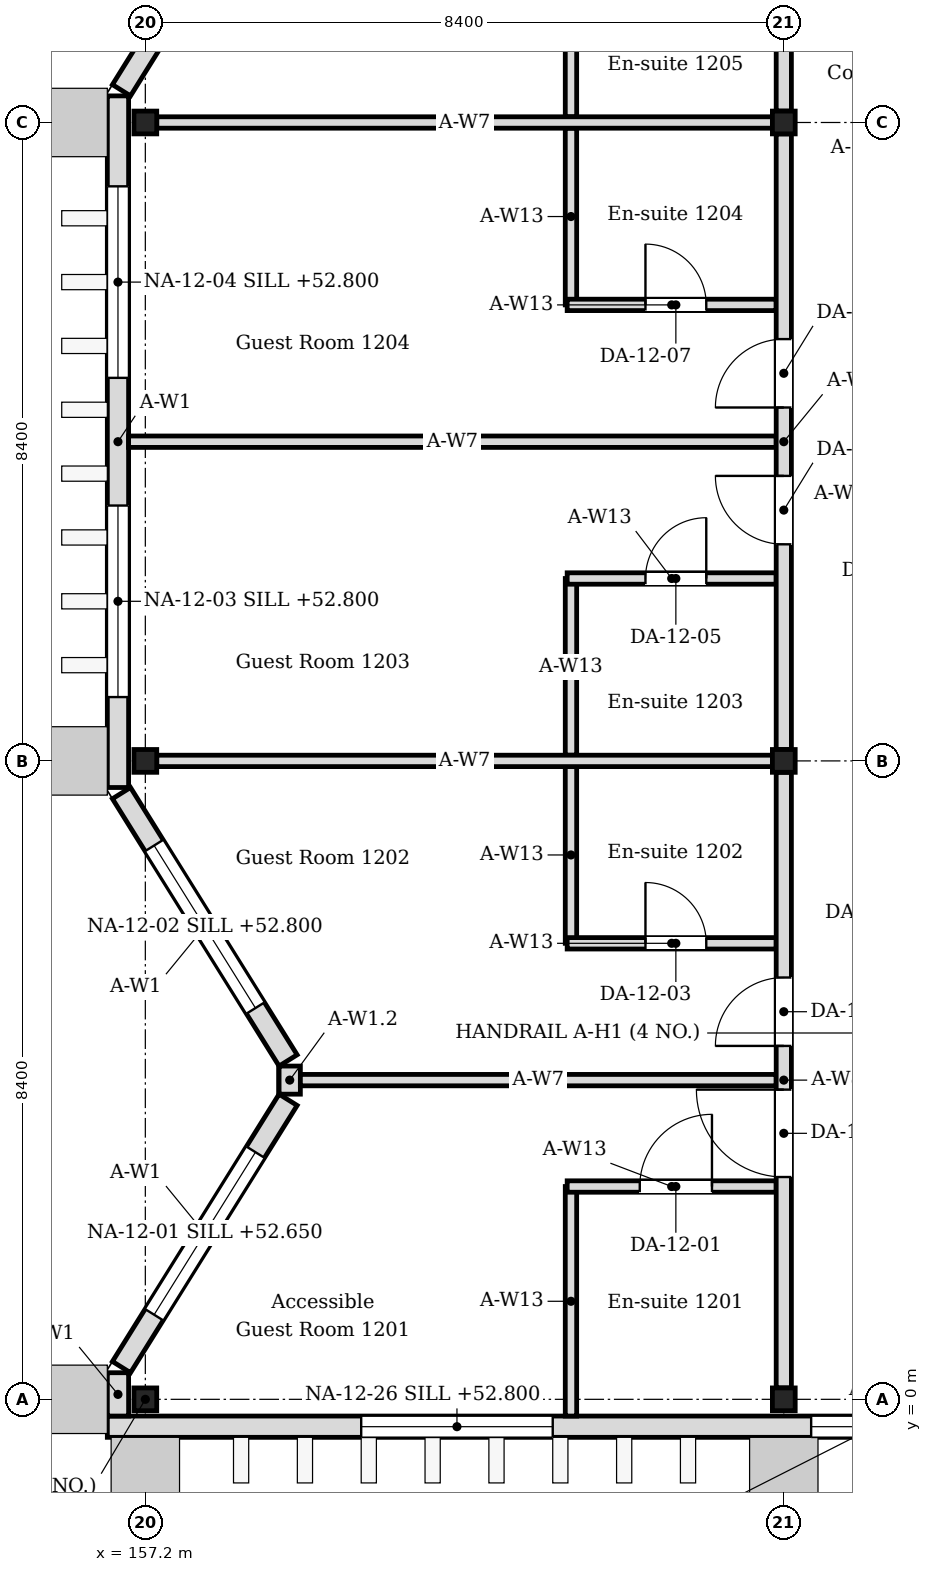
"""IFC4 building model, lengths in metres.
Left out: names, types, materials, properties, quantities, classifications, styles, units other than length and angle.
Written with IfcOpenShell. Run it as: python <this file> out.ifc"""

import sys

from ifc_helpers import new_model, si_unit, direction, frame, frame_2d, origin, origin_2d, place, context, subcontext, project, spatial, rectangle, i_section, extrude, element, fill, save


model = new_model("IFC4")
c1 = context("Model", 3, precision=1e-05, world=origin(), true_north=direction((0.0, 1.0)))
c2 = subcontext(c1, "Body", "Model", "MODEL_VIEW")
j1 = project(units=[si_unit("LENGTHUNIT", "METRE"), si_unit("PLANEANGLEUNIT", "RADIAN")], contexts=[c1])
p1 = place(None, origin())
s1 = spatial("IfcSite", under=j1, at=p1, CompositionType="ELEMENT")
p2 = place(p1, origin())
s2 = spatial("IfcBuilding", under=s1, at=p2, CompositionType="ELEMENT")
p3 = place(p2, frame((0.0, 0.0, 52.2)))
s3 = spatial("IfcBuildingStorey", under=s2, at=p3, CompositionType="ELEMENT", Elevation=52.2)
for number, where, z_axis, x_axis in (
    (1, (157.2, 0.0, 0.0), (0.0, 0.0, 1.0), (1.0, 0.0, 0.0)),
    (2, (157.2, 8.4, 0.0), (0.0, 0.0, 1.0), (1.0, 0.0, 0.0)),
    (3, (157.2, 16.8, 0.0), (0.0, 0.0, 1.0), (1.0, 0.0, 0.0)),
    (4, (165.6, 0.0, 0.0), (0.0, 0.0, 1.0), (1.0, 0.0, 0.0)),
    (5, (165.6, 8.4, 0.0), (0.0, 0.0, 1.0), (1.0, 0.0, 0.0)),
    (6, (165.6, 16.8, 0.0), (0.0, 0.0, 1.0), (1.0, 0.0, 0.0)),
):
    element("IfcColumn", number, at=place(p3, frame(where, z_axis=z_axis, x_axis=x_axis)), inside=s3, PredefinedType="COLUMN", context=c2, shape_type="SweptSolid", body=[
        extrude(i_section(OverallWidth=0.3, OverallDepth=0.3, WebThickness=0.01, FlangeThickness=0.015, FilletRadius=0.013, at=origin_2d()), origin(), (0.0, 0.0, 1.0), 4.2),
    ])
p4 = place(p3, frame((156.84, -0.22, 0.0), z_axis=(0.0, 0.0, 1.0), x_axis=(0.0, 1.0, 0.0)))
e7 = element("IfcWall", 7, at=p4, inside=s3, PredefinedType="SOLIDWALL", context=c2, shape_type="SweptSolid", body=[
    extrude(rectangle(XDim=0.57, YDim=0.28, at=frame_2d((0.285, 0.0))), origin(), (0.0, 0.0, 1.0), 4.05),
])
p5 = place(p3, frame((156.886, 0.424, 0.0), z_axis=(0.0, 0.0, 1.0), x_axis=(0.529018946142, 0.848610013271, 0.0)))
e8 = element("IfcWall", 8, at=p5, inside=s3, PredefinedType="SOLIDWALL", context=c2, shape_type="SweptSolid", body=[
    extrude(rectangle(XDim=4.144, YDim=0.28, at=frame_2d((2.072, 0.0))), origin(), (0.0, 0.0, 1.0), 4.05),
])
p6 = place(p5, frame((0.812, 0.0, 0.45)))
e9 = element("IfcOpeningElement", 9, at=p6, cuts=e8, PredefinedType="OPENING", context=c2, shape_type="SweptSolid", body=[
    extrude(rectangle(XDim=2.52, YDim=2.1, at=frame_2d((1.26, 1.05))), frame((0.0, 0.15, 0.0), z_axis=(0.0, -1.0, 0.0), x_axis=(1.0, 0.0, 0.0)), (0.0, 0.0, 1.0), 0.3),
])
p7 = place(p3, frame((159.079, 4.459, 0.0), z_axis=(0.0, 0.0, 1.0), x_axis=(-0.529018946142, 0.848610013271, 0.0)))
e10 = element("IfcWall", 10, at=p7, inside=s3, PredefinedType="SOLIDWALL", context=c2, shape_type="SweptSolid", body=[
    extrude(rectangle(XDim=4.144, YDim=0.28, at=frame_2d((2.072, 0.0))), origin(), (0.0, 0.0, 1.0), 4.05),
])
p8 = place(p7, frame((0.812, 0.0, 0.6)))
e11 = element("IfcOpeningElement", 11, at=p8, cuts=e10, PredefinedType="OPENING", context=c2, shape_type="SweptSolid", body=[
    extrude(rectangle(XDim=2.52, YDim=2.4, at=frame_2d((1.26, 1.2))), frame((0.0, 0.15, 0.0), z_axis=(0.0, -1.0, 0.0), x_axis=(1.0, 0.0, 0.0)), (0.0, 0.0, 1.0), 0.3),
])
p9 = place(p3, frame((159.1, 4.015, 0.0), z_axis=(0.0, 0.0, 1.0), x_axis=(0.0, 1.0, 0.0)))
e12 = element("IfcWall", 12, at=p9, inside=s3, PredefinedType="SOLIDWALL", context=c2, shape_type="SweptSolid", body=[
    extrude(rectangle(XDim=0.37, YDim=0.28, at=frame_2d((0.185, 0.0))), origin(), (0.0, 0.0, 1.0), 3.604),
])
p10 = place(p3, frame((156.84, 8.05, 0.0), z_axis=(0.0, 0.0, 1.0), x_axis=(0.0, 1.0, 0.0)))
e13 = element("IfcWall", 13, at=p10, inside=s3, PredefinedType="SOLIDWALL", context=c2, shape_type="SweptSolid", body=[
    extrude(rectangle(XDim=9.1, YDim=0.28, at=frame_2d((4.55, 0.0))), origin(), (0.0, 0.0, 1.0), 4.05),
])
p11 = place(p10, frame((1.19, 0.0, 0.6)))
e14 = element("IfcOpeningElement", 14, at=p11, cuts=e13, PredefinedType="OPENING", context=c2, shape_type="SweptSolid", body=[
    extrude(rectangle(XDim=2.52, YDim=2.4, at=frame_2d((1.26, 1.2))), frame((0.0, 0.15, 0.0), z_axis=(0.0, -1.0, 0.0), x_axis=(1.0, 0.0, 0.0)), (0.0, 0.0, 1.0), 0.3),
])
p12 = place(p10, frame((5.39, 0.0, 0.6)))
e15 = element("IfcOpeningElement", 15, at=p12, cuts=e13, PredefinedType="OPENING", context=c2, shape_type="SweptSolid", body=[
    extrude(rectangle(XDim=2.52, YDim=2.4, at=frame_2d((1.26, 1.2))), frame((0.0, 0.15, 0.0), z_axis=(0.0, -1.0, 0.0), x_axis=(1.0, 0.0, 0.0)), (0.0, 0.0, 1.0), 0.3),
])
p13 = place(p3, frame((156.886, 17.224, 0.0), z_axis=(0.0, 0.0, 1.0), x_axis=(0.529018946142, 0.848610013271, 0.0)))
e16 = element("IfcWall", 16, at=p13, inside=s3, PredefinedType="SOLIDWALL", context=c2, shape_type="SweptSolid", body=[
    extrude(rectangle(XDim=4.144, YDim=0.28, at=frame_2d((2.072, 0.0))), origin(), (0.0, 0.0, 1.0), 4.05),
])
p14 = place(p13, frame((0.812, 0.0, 0.6)))
e17 = element("IfcOpeningElement", 17, at=p14, cuts=e16, PredefinedType="OPENING", context=c2, shape_type="SweptSolid", body=[
    extrude(rectangle(XDim=2.52, YDim=2.4, at=frame_2d((1.26, 1.2))), frame((0.0, 0.15, 0.0), z_axis=(0.0, -1.0, 0.0), x_axis=(1.0, 0.0, 0.0)), (0.0, 0.0, 1.0), 0.3),
])
p15 = place(p3, frame((156.7, -0.36, 0.0), z_axis=(0.0, 0.0, 1.0), x_axis=(1.0, 0.0, 0.0)))
e18 = element("IfcWall", 18, at=p15, inside=s3, PredefinedType="SOLIDWALL", context=c2, shape_type="SweptSolid", body=[
    extrude(rectangle(XDim=20.2, YDim=0.28, at=frame_2d((10.1, 0.0))), origin(), (0.0, 0.0, 1.0), 4.05),
])
p16 = place(p15, frame((9.26, 0.0, 0.6)))
e19 = element("IfcOpeningElement", 19, at=p16, cuts=e18, PredefinedType="OPENING", context=c2, shape_type="SweptSolid", body=[
    extrude(rectangle(XDim=1.68, YDim=2.4, at=frame_2d((0.84, 1.2))), frame((0.0, 0.15, 0.0), z_axis=(0.0, -1.0, 0.0), x_axis=(1.0, 0.0, 0.0)), (0.0, 0.0, 1.0), 0.3),
])
p17 = place(p15, frame((3.34, 0.0, 0.6)))
e20 = element("IfcOpeningElement", 20, at=p17, cuts=e18, PredefinedType="OPENING", context=c2, shape_type="SweptSolid", body=[
    extrude(rectangle(XDim=2.52, YDim=2.4, at=frame_2d((1.26, 1.2))), frame((0.0, 0.15, 0.0), z_axis=(0.0, -1.0, 0.0), x_axis=(1.0, 0.0, 0.0)), (0.0, 0.0, 1.0), 0.3),
])
p18 = place(p3, frame((162.8, -0.22, 0.0), z_axis=(0.0, 0.0, 1.0), x_axis=(0.0, 1.0, 0.0)))
e21 = element("IfcWall", 21, at=p18, inside=s3, PredefinedType="PARTITIONING", context=c2, shape_type="SweptSolid", body=[
    extrude(rectangle(XDim=3.02, YDim=0.15, at=frame_2d((1.51, 0.0))), origin(), (0.0, 0.0, 1.0), 4.05),
])
p19 = place(p3, frame((162.75, 2.8, 0.0), z_axis=(0.0, 0.0, 1.0), x_axis=(1.0, 0.0, 0.0)))
e22 = element("IfcWall", 22, at=p19, inside=s3, PredefinedType="PARTITIONING", context=c2, shape_type="SweptSolid", body=[
    extrude(rectangle(XDim=2.75, YDim=0.15, at=frame_2d((1.375, 0.0))), origin(), (0.0, 0.0, 1.0), 4.05),
])
p20 = place(p19, frame((0.955, 0.0, 0.0)))
e23 = element("IfcOpeningElement", 23, at=p20, cuts=e22, PredefinedType="OPENING", context=c2, shape_type="SweptSolid", body=[
    extrude(rectangle(XDim=0.95, YDim=2.1, at=frame_2d((0.475, 1.05))), frame((0.0, 0.085, 0.0), z_axis=(0.0, -1.0, 0.0), x_axis=(1.0, 0.0, 0.0)), (0.0, 0.0, 1.0), 0.17),
])
p21 = place(p3, frame((162.8, 6.0, 0.0), z_axis=(0.0, 0.0, 1.0), x_axis=(0.0, 1.0, 0.0)))
e24 = element("IfcWall", 24, at=p21, inside=s3, PredefinedType="PARTITIONING", context=c2, shape_type="SweptSolid", body=[
    extrude(rectangle(XDim=2.325, YDim=0.15, at=frame_2d((1.163, 0.0))), origin(), (0.0, 0.0, 1.0), 4.05),
])
p22 = place(p3, frame((162.75, 6.0, 0.0), z_axis=(0.0, 0.0, 1.0), x_axis=(1.0, 0.0, 0.0)))
e25 = element("IfcWall", 25, at=p22, inside=s3, PredefinedType="PARTITIONING", context=c2, shape_type="SweptSolid", body=[
    extrude(rectangle(XDim=2.75, YDim=0.15, at=frame_2d((1.375, 0.0))), origin(), (0.0, 0.0, 1.0), 4.05),
])
p23 = place(p22, frame((1.03, 0.0, 0.0)))
e26 = element("IfcOpeningElement", 26, at=p23, cuts=e25, PredefinedType="OPENING", context=c2, shape_type="SweptSolid", body=[
    extrude(rectangle(XDim=0.8, YDim=2.1, at=frame_2d((0.4, 1.05))), frame((0.0, 0.085, 0.0), z_axis=(0.0, -1.0, 0.0), x_axis=(1.0, 0.0, 0.0)), (0.0, 0.0, 1.0), 0.17),
])
p24 = place(p3, frame((162.8, 8.475, 0.0), z_axis=(0.0, 0.0, 1.0), x_axis=(0.0, 1.0, 0.0)))
e27 = element("IfcWall", 27, at=p24, inside=s3, PredefinedType="PARTITIONING", context=c2, shape_type="SweptSolid", body=[
    extrude(rectangle(XDim=2.325, YDim=0.15, at=frame_2d((1.163, 0.0))), origin(), (0.0, 0.0, 1.0), 4.05),
])
p25 = place(p3, frame((162.75, 10.8, 0.0), z_axis=(0.0, 0.0, 1.0), x_axis=(1.0, 0.0, 0.0)))
e28 = element("IfcWall", 28, at=p25, inside=s3, PredefinedType="PARTITIONING", context=c2, shape_type="SweptSolid", body=[
    extrude(rectangle(XDim=2.75, YDim=0.15, at=frame_2d((1.375, 0.0))), origin(), (0.0, 0.0, 1.0), 4.05),
])
p26 = place(p25, frame((1.03, 0.0, 0.0)))
e29 = element("IfcOpeningElement", 29, at=p26, cuts=e28, PredefinedType="OPENING", context=c2, shape_type="SweptSolid", body=[
    extrude(rectangle(XDim=0.8, YDim=2.1, at=frame_2d((0.4, 1.05))), frame((0.0, 0.085, 0.0), z_axis=(0.0, -1.0, 0.0), x_axis=(1.0, 0.0, 0.0)), (0.0, 0.0, 1.0), 0.17),
])
p27 = place(p3, frame((162.8, 14.4, 0.0), z_axis=(0.0, 0.0, 1.0), x_axis=(0.0, 1.0, 0.0)))
e30 = element("IfcWall", 30, at=p27, inside=s3, PredefinedType="PARTITIONING", context=c2, shape_type="SweptSolid", body=[
    extrude(rectangle(XDim=2.325, YDim=0.15, at=frame_2d((1.163, 0.0))), origin(), (0.0, 0.0, 1.0), 4.05),
])
p28 = place(p3, frame((162.75, 14.4, 0.0), z_axis=(0.0, 0.0, 1.0), x_axis=(1.0, 0.0, 0.0)))
e31 = element("IfcWall", 31, at=p28, inside=s3, PredefinedType="PARTITIONING", context=c2, shape_type="SweptSolid", body=[
    extrude(rectangle(XDim=2.75, YDim=0.15, at=frame_2d((1.375, 0.0))), origin(), (0.0, 0.0, 1.0), 4.05),
])
p29 = place(p28, frame((1.03, 0.0, 0.0)))
e32 = element("IfcOpeningElement", 32, at=p29, cuts=e31, PredefinedType="OPENING", context=c2, shape_type="SweptSolid", body=[
    extrude(rectangle(XDim=0.8, YDim=2.1, at=frame_2d((0.4, 1.05))), frame((0.0, 0.085, 0.0), z_axis=(0.0, -1.0, 0.0), x_axis=(1.0, 0.0, 0.0)), (0.0, 0.0, 1.0), 0.17),
])
p30 = place(p3, frame((162.8, 16.875, 0.0), z_axis=(0.0, 0.0, 1.0), x_axis=(0.0, 1.0, 0.0)))
e33 = element("IfcWall", 33, at=p30, inside=s3, PredefinedType="PARTITIONING", context=c2, shape_type="SweptSolid", body=[
    extrude(rectangle(XDim=2.325, YDim=0.15, at=frame_2d((1.163, 0.0))), origin(), (0.0, 0.0, 1.0), 4.05),
])
for number, where, z_axis, x_axis in (
    (34, (157.35, 8.4, 0.0), (0.0, 0.0, 1.0), (1.0, 0.0, 0.0)),
    (35, (157.35, 16.8, 0.0), (0.0, 0.0, 1.0), (1.0, 0.0, 0.0)),
):
    element("IfcWall", number, at=place(p3, frame(where, z_axis=z_axis, x_axis=x_axis)), inside=s3, PredefinedType="PARTITIONING", context=c2, shape_type="SweptSolid", body=[
        extrude(rectangle(XDim=8.1, YDim=0.15, at=frame_2d((4.05, 0.0))), origin(), (0.0, 0.0, 1.0), 3.604),
    ])
p31 = place(p3, frame((159.24, 4.2, 0.0), z_axis=(0.0, 0.0, 1.0), x_axis=(1.0, 0.0, 0.0)))
e36 = element("IfcWall", 36, at=p31, inside=s3, PredefinedType="PARTITIONING", context=c2, shape_type="SweptSolid", body=[
    extrude(rectangle(XDim=6.26, YDim=0.15, at=frame_2d((3.13, 0.0))), origin(), (0.0, 0.0, 1.0), 3.604),
])
p32 = place(p3, frame((156.98, 12.6, 0.0), z_axis=(0.0, 0.0, 1.0), x_axis=(1.0, 0.0, 0.0)))
e37 = element("IfcWall", 37, at=p32, inside=s3, PredefinedType="PARTITIONING", context=c2, shape_type="SweptSolid", body=[
    extrude(rectangle(XDim=8.52, YDim=0.15, at=frame_2d((4.26, 0.0))), origin(), (0.0, 0.0, 1.0), 3.604),
])
p33 = place(p3, frame((165.6, 0.15, 0.0), z_axis=(0.0, 0.0, 1.0), x_axis=(0.0, 1.0, 0.0)))
e38 = element("IfcWall", 38, at=p33, inside=s3, PredefinedType="PARTITIONING", context=c2, shape_type="SweptSolid", body=[
    extrude(rectangle(XDim=8.1, YDim=0.2, at=frame_2d((4.05, 0.0))), origin(), (0.0, 0.0, 1.0), 3.45),
])
p34 = place(p33, frame((2.775, 0.0, 0.0)))
e39 = element("IfcOpeningElement", 39, at=p34, cuts=e38, PredefinedType="OPENING", context=c2, shape_type="SweptSolid", body=[
    extrude(rectangle(XDim=1.15, YDim=2.1, at=frame_2d((0.575, 1.05))), frame((0.0, 0.11, 0.0), z_axis=(0.0, -1.0, 0.0), x_axis=(1.0, 0.0, 0.0)), (0.0, 0.0, 1.0), 0.22),
])
p35 = place(p33, frame((4.5, 0.0, 0.0)))
e40 = element("IfcOpeningElement", 40, at=p35, cuts=e38, PredefinedType="OPENING", context=c2, shape_type="SweptSolid", body=[
    extrude(rectangle(XDim=0.9, YDim=2.1, at=frame_2d((0.45, 1.05))), frame((0.0, 0.11, 0.0), z_axis=(0.0, -1.0, 0.0), x_axis=(1.0, 0.0, 0.0)), (0.0, 0.0, 1.0), 0.22),
])
p36 = place(p3, frame((165.6, 8.55, 0.0), z_axis=(0.0, 0.0, 1.0), x_axis=(0.0, 1.0, 0.0)))
e41 = element("IfcWall", 41, at=p36, inside=s3, PredefinedType="PARTITIONING", context=c2, shape_type="SweptSolid", body=[
    extrude(rectangle(XDim=8.1, YDim=0.2, at=frame_2d((4.05, 0.0))), origin(), (0.0, 0.0, 1.0), 3.45),
])
p37 = place(p36, frame((2.7, 0.0, 0.0)))
e42 = element("IfcOpeningElement", 42, at=p37, cuts=e41, PredefinedType="OPENING", context=c2, shape_type="SweptSolid", body=[
    extrude(rectangle(XDim=0.9, YDim=2.1, at=frame_2d((0.45, 1.05))), frame((0.0, 0.11, 0.0), z_axis=(0.0, -1.0, 0.0), x_axis=(1.0, 0.0, 0.0)), (0.0, 0.0, 1.0), 0.22),
])
p38 = place(p36, frame((4.5, 0.0, 0.0)))
e43 = element("IfcOpeningElement", 43, at=p38, cuts=e41, PredefinedType="OPENING", context=c2, shape_type="SweptSolid", body=[
    extrude(rectangle(XDim=0.9, YDim=2.1, at=frame_2d((0.45, 1.05))), frame((0.0, 0.11, 0.0), z_axis=(0.0, -1.0, 0.0), x_axis=(1.0, 0.0, 0.0)), (0.0, 0.0, 1.0), 0.22),
])
p39 = place(p3, frame((165.6, 16.95, 0.0), z_axis=(0.0, 0.0, 1.0), x_axis=(0.0, 1.0, 0.0)))
e44 = element("IfcWall", 44, at=p39, inside=s3, PredefinedType="PARTITIONING", context=c2, shape_type="SweptSolid", body=[
    extrude(rectangle(XDim=8.1, YDim=0.2, at=frame_2d((4.05, 0.0))), origin(), (0.0, 0.0, 1.0), 3.45),
])
p40 = place(p39, frame((2.7, 0.0, 0.0)))
e45 = element("IfcOpeningElement", 45, at=p40, cuts=e44, PredefinedType="OPENING", context=c2, shape_type="SweptSolid", body=[
    extrude(rectangle(XDim=0.9, YDim=2.1, at=frame_2d((0.45, 1.05))), frame((0.0, 0.11, 0.0), z_axis=(0.0, -1.0, 0.0), x_axis=(1.0, 0.0, 0.0)), (0.0, 0.0, 1.0), 0.22),
])
p41 = place(p39, frame((4.5, 0.0, 0.0)))
e46 = element("IfcOpeningElement", 46, at=p41, cuts=e44, PredefinedType="OPENING", context=c2, shape_type="SweptSolid", body=[
    extrude(rectangle(XDim=0.9, YDim=2.1, at=frame_2d((0.45, 1.05))), frame((0.0, 0.11, 0.0), z_axis=(0.0, -1.0, 0.0), x_axis=(1.0, 0.0, 0.0)), (0.0, 0.0, 1.0), 0.22),
])
p42 = place(p6, origin())
e47 = element("IfcWindow", 47, at=p42, inside=s3, PartitioningType="SINGLE_PANEL", PredefinedType="WINDOW", context=c2, shape_type="SweptSolid", body=[
    extrude(rectangle(XDim=2.52, YDim=2.1, at=frame_2d((1.26, 1.05))), frame((0.0, 0.03, 0.0), z_axis=(0.0, -1.0, 0.0), x_axis=(1.0, 0.0, 0.0)), (0.0, 0.0, 1.0), 0.06),
])
fill(e9, e47)
p43 = place(p8, origin())
e48 = element("IfcWindow", 48, at=p43, inside=s3, PartitioningType="SINGLE_PANEL", PredefinedType="WINDOW", context=c2, shape_type="SweptSolid", body=[
    extrude(rectangle(XDim=2.52, YDim=2.4, at=frame_2d((1.26, 1.2))), frame((0.0, 0.03, 0.0), z_axis=(0.0, -1.0, 0.0), x_axis=(1.0, 0.0, 0.0)), (0.0, 0.0, 1.0), 0.06),
])
fill(e11, e48)
p44 = place(p11, origin())
e49 = element("IfcWindow", 49, at=p44, inside=s3, PartitioningType="SINGLE_PANEL", PredefinedType="WINDOW", context=c2, shape_type="SweptSolid", body=[
    extrude(rectangle(XDim=2.52, YDim=2.4, at=frame_2d((1.26, 1.2))), frame((0.0, 0.03, 0.0), z_axis=(0.0, -1.0, 0.0), x_axis=(1.0, 0.0, 0.0)), (0.0, 0.0, 1.0), 0.06),
])
fill(e14, e49)
p45 = place(p12, origin())
e50 = element("IfcWindow", 50, at=p45, inside=s3, PartitioningType="SINGLE_PANEL", PredefinedType="WINDOW", context=c2, shape_type="SweptSolid", body=[
    extrude(rectangle(XDim=2.52, YDim=2.4, at=frame_2d((1.26, 1.2))), frame((0.0, 0.03, 0.0), z_axis=(0.0, -1.0, 0.0), x_axis=(1.0, 0.0, 0.0)), (0.0, 0.0, 1.0), 0.06),
])
fill(e15, e50)
p46 = place(p16, origin())
e51 = element("IfcWindow", 51, at=p46, inside=s3, PartitioningType="SINGLE_PANEL", PredefinedType="WINDOW", context=c2, shape_type="SweptSolid", body=[
    extrude(rectangle(XDim=1.68, YDim=2.4, at=frame_2d((0.84, 1.2))), frame((0.0, 0.03, 0.0), z_axis=(0.0, -1.0, 0.0), x_axis=(1.0, 0.0, 0.0)), (0.0, 0.0, 1.0), 0.06),
])
fill(e19, e51)
p47 = place(p17, origin())
e52 = element("IfcWindow", 52, at=p47, inside=s3, PartitioningType="SINGLE_PANEL", PredefinedType="WINDOW", context=c2, shape_type="SweptSolid", body=[
    extrude(rectangle(XDim=2.52, YDim=2.4, at=frame_2d((1.26, 1.2))), frame((0.0, 0.03, 0.0), z_axis=(0.0, -1.0, 0.0), x_axis=(1.0, 0.0, 0.0)), (0.0, 0.0, 1.0), 0.06),
])
fill(e20, e52)
p48 = place(p20, origin())
e53 = element("IfcDoor", 53, at=p48, inside=s3, OperationType="SINGLE_SWING_RIGHT", PredefinedType="DOOR", context=c2, shape_type="SweptSolid", body=[
    extrude(rectangle(XDim=0.95, YDim=2.1, at=frame_2d((0.475, 1.05))), frame((0.0, 0.025, 0.0), z_axis=(0.0, -1.0, 0.0), x_axis=(1.0, 0.0, 0.0)), (0.0, 0.0, 1.0), 0.05),
])
fill(e23, e53)
p49 = place(p34, origin())
e54 = element("IfcDoor", 54, at=p49, inside=s3, OperationType="SINGLE_SWING_RIGHT", PredefinedType="DOOR", context=c2, shape_type="SweptSolid", body=[
    extrude(rectangle(XDim=1.15, YDim=2.1, at=frame_2d((0.575, 1.05))), frame((0.0, 0.025, 0.0), z_axis=(0.0, -1.0, 0.0), x_axis=(1.0, 0.0, 0.0)), (0.0, 0.0, 1.0), 0.05),
])
fill(e39, e54)
p50 = place(p23, origin())
e55 = element("IfcDoor", 55, at=p50, inside=s3, OperationType="SINGLE_SWING_LEFT", PredefinedType="DOOR", context=c2, shape_type="SweptSolid", body=[
    extrude(rectangle(XDim=0.8, YDim=2.1, at=frame_2d((0.4, 1.05))), frame((0.0, 0.025, 0.0), z_axis=(0.0, -1.0, 0.0), x_axis=(1.0, 0.0, 0.0)), (0.0, 0.0, 1.0), 0.05),
])
fill(e26, e55)
p51 = place(p35, origin())
e56 = element("IfcDoor", 56, at=p51, inside=s3, OperationType="SINGLE_SWING_LEFT", PredefinedType="DOOR", context=c2, shape_type="SweptSolid", body=[
    extrude(rectangle(XDim=0.9, YDim=2.1, at=frame_2d((0.45, 1.05))), frame((0.0, 0.025, 0.0), z_axis=(0.0, -1.0, 0.0), x_axis=(1.0, 0.0, 0.0)), (0.0, 0.0, 1.0), 0.05),
])
fill(e40, e56)
p52 = place(p26, origin())
e57 = element("IfcDoor", 57, at=p52, inside=s3, OperationType="SINGLE_SWING_RIGHT", PredefinedType="DOOR", context=c2, shape_type="SweptSolid", body=[
    extrude(rectangle(XDim=0.8, YDim=2.1, at=frame_2d((0.4, 1.05))), frame((0.0, 0.025, 0.0), z_axis=(0.0, -1.0, 0.0), x_axis=(1.0, 0.0, 0.0)), (0.0, 0.0, 1.0), 0.05),
])
fill(e29, e57)
p53 = place(p37, origin())
e58 = element("IfcDoor", 58, at=p53, inside=s3, OperationType="SINGLE_SWING_RIGHT", PredefinedType="DOOR", context=c2, shape_type="SweptSolid", body=[
    extrude(rectangle(XDim=0.9, YDim=2.1, at=frame_2d((0.45, 1.05))), frame((0.0, 0.025, 0.0), z_axis=(0.0, -1.0, 0.0), x_axis=(1.0, 0.0, 0.0)), (0.0, 0.0, 1.0), 0.05),
])
fill(e42, e58)
p54 = place(p29, origin())
e59 = element("IfcDoor", 59, at=p54, inside=s3, OperationType="SINGLE_SWING_LEFT", PredefinedType="DOOR", context=c2, shape_type="SweptSolid", body=[
    extrude(rectangle(XDim=0.8, YDim=2.1, at=frame_2d((0.4, 1.05))), frame((0.0, 0.025, 0.0), z_axis=(0.0, -1.0, 0.0), x_axis=(1.0, 0.0, 0.0)), (0.0, 0.0, 1.0), 0.05),
])
fill(e32, e59)
p55 = place(p38, origin())
e60 = element("IfcDoor", 60, at=p55, inside=s3, OperationType="SINGLE_SWING_LEFT", PredefinedType="DOOR", context=c2, shape_type="SweptSolid", body=[
    extrude(rectangle(XDim=0.9, YDim=2.1, at=frame_2d((0.45, 1.05))), frame((0.0, 0.025, 0.0), z_axis=(0.0, -1.0, 0.0), x_axis=(1.0, 0.0, 0.0)), (0.0, 0.0, 1.0), 0.05),
])
fill(e43, e60)
save(model, sys.argv[1])
